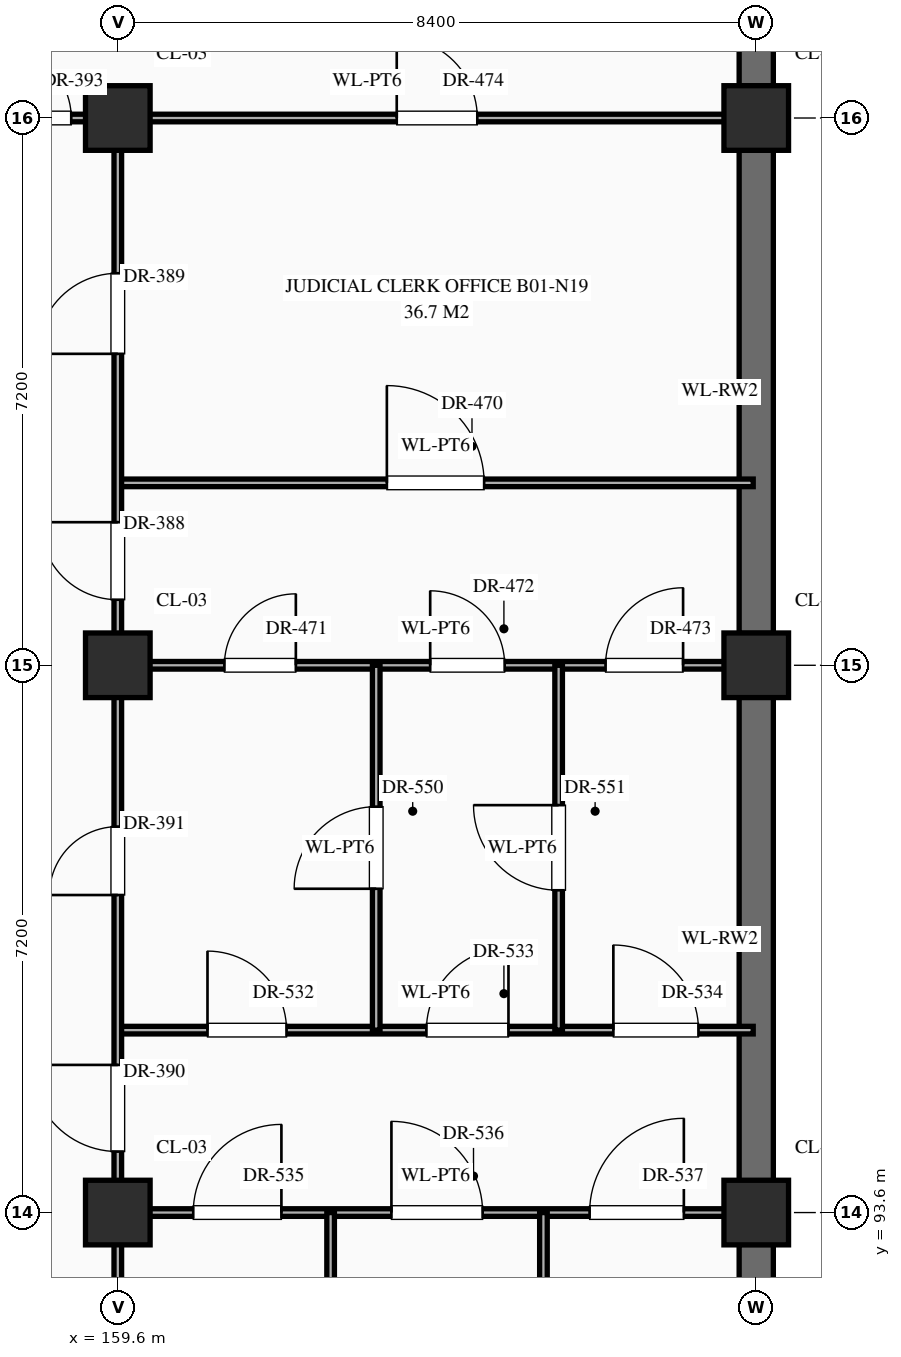
"""IFC4 building model, lengths in metres.
Left out: names, types, materials, properties, quantities, classifications, styles, units other than length and angle.
Written with IfcOpenShell. Run it as: python <this file> out.ifc"""

import sys

from ifc_helpers import new_model, si_unit, direction, frame, frame_2d, origin, origin_2d, place, context, subcontext, project, spatial, rectangle, extrude, element, fill, save


model = new_model("IFC4")
c1 = context("Model", 3, precision=1e-05, world=origin(), true_north=direction((0.0, 1.0)))
c2 = subcontext(c1, "Body", "Model", "MODEL_VIEW")
j1 = project(units=[si_unit("LENGTHUNIT", "METRE"), si_unit("PLANEANGLEUNIT", "RADIAN")], contexts=[c1])
p1 = place(None, origin())
s1 = spatial("IfcSite", under=j1, at=p1, CompositionType="ELEMENT")
p2 = place(p1, origin())
s2 = spatial("IfcBuilding", under=s1, at=p2, CompositionType="ELEMENT")
p3 = place(p2, frame((0.0, 0.0, -5.4)))
s3 = spatial("IfcBuildingStorey", under=s2, at=p3, CompositionType="ELEMENT", Elevation=-5.4)
for number, where, z_axis, x_axis in (
    (1, (159.6, 93.6, 0.0), (0.0, 0.0, 1.0), (1.0, 0.0, 0.0)),
    (2, (159.6, 100.8, 0.0), (0.0, 0.0, 1.0), (1.0, 0.0, 0.0)),
    (3, (159.6, 108.0, 0.0), (0.0, 0.0, 1.0), (1.0, 0.0, 0.0)),
    (4, (168.0, 93.6, 0.0), (0.0, 0.0, 1.0), (1.0, 0.0, 0.0)),
    (5, (168.0, 100.8, 0.0), (0.0, 0.0, 1.0), (1.0, 0.0, 0.0)),
    (6, (168.0, 108.0, 0.0), (0.0, 0.0, 1.0), (1.0, 0.0, 0.0)),
):
    element("IfcColumn", number, at=place(p3, frame(where, z_axis=z_axis, x_axis=x_axis)), inside=s3, PredefinedType="COLUMN", context=c2, shape_type="SweptSolid", body=[
        extrude(rectangle(XDim=0.85, YDim=0.85, at=origin_2d()), origin(), (0.0, 0.0, 1.0), 5.4),
    ])
for number, where, z_axis, x_axis in (
    (7, (168.0, 86.82, 0.0), (0.0, 0.0, 1.0), (0.0, 1.0, 0.0)),
    (8, (168.0, 94.02, 0.0), (0.0, 0.0, 1.0), (0.0, 1.0, 0.0)),
):
    element("IfcWall", number, at=place(p3, frame(where, z_axis=z_axis, x_axis=x_axis)), inside=s3, PredefinedType="USERDEFINED", context=c2, shape_type="SweptSolid", body=[
        extrude(rectangle(XDim=6.36, YDim=0.45, at=frame_2d((3.18, 0.0))), origin(), (0.0, 0.0, 1.0), 5.1),
    ])
p4 = place(p3, frame((168.0, 101.22, 0.0), z_axis=(0.0, 0.0, 1.0), x_axis=(0.0, 1.0, 0.0)))
e9 = element("IfcWall", 9, at=p4, inside=s3, PredefinedType="USERDEFINED", context=c2, shape_type="SweptSolid", body=[
    extrude(rectangle(XDim=6.36, YDim=0.45, at=frame_2d((3.18, 0.0))), origin(), (0.0, 0.0, 1.0), 5.1),
])
p5 = place(p3, frame((168.0, 108.42, 0.0), z_axis=(0.0, 0.0, 1.0), x_axis=(0.0, 1.0, 0.0)))
e10 = element("IfcWall", 10, at=p5, inside=s3, PredefinedType="USERDEFINED", context=c2, shape_type="SweptSolid", body=[
    extrude(rectangle(XDim=6.36, YDim=0.45, at=frame_2d((3.18, 0.0))), origin(), (0.0, 0.0, 1.0), 4.98),
])
p6 = place(p3, frame((159.6, 93.6, 0.0), z_axis=(0.0, 0.0, 1.0), x_axis=(1.0, 0.0, 0.0)))
e11 = element("IfcWall", 11, at=p6, inside=s3, PredefinedType="STANDARD", context=c2, shape_type="SweptSolid", body=[
    extrude(rectangle(XDim=8.36, YDim=0.1, at=frame_2d((4.18, 0.0))), origin(), (0.0, 0.0, 1.0), 4.25),
])
p7 = place(p6, frame((0.992, 0.0, 0.0)))
e12 = element("IfcOpeningElement", 12, at=p7, cuts=e11, PredefinedType="OPENING", context=c2, shape_type="SweptSolid", body=[
    extrude(rectangle(XDim=1.16, YDim=2.3, at=frame_2d((0.58, 1.15))), frame((0.0, 0.062, 0.0), z_axis=(0.0, -1.0, 0.0), x_axis=(1.0, 0.0, 0.0)), (0.0, 0.0, 1.0), 0.124),
])
p8 = place(p6, frame((3.6, 0.0, 0.0)))
e13 = element("IfcOpeningElement", 13, at=p8, cuts=e11, PredefinedType="OPENING", context=c2, shape_type="SweptSolid", body=[
    extrude(rectangle(XDim=1.2, YDim=2.35, at=frame_2d((0.6, 1.175))), frame((0.0, 0.062, 0.0), z_axis=(0.0, -1.0, 0.0), x_axis=(1.0, 0.0, 0.0)), (0.0, 0.0, 1.0), 0.124),
])
p9 = place(p6, frame((6.208, 0.0, 0.0)))
e14 = element("IfcOpeningElement", 14, at=p9, cuts=e11, PredefinedType="OPENING", context=c2, shape_type="SweptSolid", body=[
    extrude(rectangle(XDim=1.24, YDim=2.3, at=frame_2d((0.62, 1.15))), frame((0.0, 0.062, 0.0), z_axis=(0.0, -1.0, 0.0), x_axis=(1.0, 0.0, 0.0)), (0.0, 0.0, 1.0), 0.124),
])
p10 = place(p3, frame((159.6, 96.0, 0.0), z_axis=(0.0, 0.0, 1.0), x_axis=(1.0, 0.0, 0.0)))
e15 = element("IfcWall", 15, at=p10, inside=s3, PredefinedType="STANDARD", context=c2, shape_type="SweptSolid", body=[
    extrude(rectangle(XDim=8.36, YDim=0.1, at=frame_2d((4.18, 0.0))), origin(), (0.0, 0.0, 1.0), 5.1),
])
p11 = place(p10, frame((1.18, 0.0, 0.0)))
e16 = element("IfcOpeningElement", 16, at=p11, cuts=e15, PredefinedType="OPENING", context=c2, shape_type="SweptSolid", body=[
    extrude(rectangle(XDim=1.04, YDim=2.2, at=frame_2d((0.52, 1.1))), frame((0.0, 0.062, 0.0), z_axis=(0.0, -1.0, 0.0), x_axis=(1.0, 0.0, 0.0)), (0.0, 0.0, 1.0), 0.124),
])
p12 = place(p10, frame((4.06, 0.0, 0.0)))
e17 = element("IfcOpeningElement", 17, at=p12, cuts=e15, PredefinedType="OPENING", context=c2, shape_type="SweptSolid", body=[
    extrude(rectangle(XDim=1.08, YDim=2.25, at=frame_2d((0.54, 1.125))), frame((0.0, 0.062, 0.0), z_axis=(0.0, -1.0, 0.0), x_axis=(1.0, 0.0, 0.0)), (0.0, 0.0, 1.0), 0.124),
])
p13 = place(p10, frame((6.52, 0.0, 0.0)))
e18 = element("IfcOpeningElement", 18, at=p13, cuts=e15, PredefinedType="OPENING", context=c2, shape_type="SweptSolid", body=[
    extrude(rectangle(XDim=1.12, YDim=2.25, at=frame_2d((0.56, 1.125))), frame((0.0, 0.062, 0.0), z_axis=(0.0, -1.0, 0.0), x_axis=(1.0, 0.0, 0.0)), (0.0, 0.0, 1.0), 0.124),
])
p14 = place(p3, frame((159.6, 100.8, 0.0), z_axis=(0.0, 0.0, 1.0), x_axis=(1.0, 0.0, 0.0)))
e19 = element("IfcWall", 19, at=p14, inside=s3, PredefinedType="STANDARD", context=c2, shape_type="SweptSolid", body=[
    extrude(rectangle(XDim=8.36, YDim=0.1, at=frame_2d((4.18, 0.0))), origin(), (0.0, 0.0, 1.0), 4.25),
])
p15 = place(p14, frame((1.403, 0.0, 0.0)))
e20 = element("IfcOpeningElement", 20, at=p15, cuts=e19, PredefinedType="OPENING", context=c2, shape_type="SweptSolid", body=[
    extrude(rectangle(XDim=0.94, YDim=2.3, at=frame_2d((0.47, 1.15))), frame((0.0, 0.062, 0.0), z_axis=(0.0, -1.0, 0.0), x_axis=(1.0, 0.0, 0.0)), (0.0, 0.0, 1.0), 0.124),
])
p16 = place(p14, frame((4.11, 0.0, 0.0)))
e21 = element("IfcOpeningElement", 21, at=p16, cuts=e19, PredefinedType="OPENING", context=c2, shape_type="SweptSolid", body=[
    extrude(rectangle(XDim=0.98, YDim=2.35, at=frame_2d((0.49, 1.175))), frame((0.0, 0.062, 0.0), z_axis=(0.0, -1.0, 0.0), x_axis=(1.0, 0.0, 0.0)), (0.0, 0.0, 1.0), 0.124),
])
p17 = place(p14, frame((6.417, 0.0, 0.0)))
e22 = element("IfcOpeningElement", 22, at=p17, cuts=e19, PredefinedType="OPENING", context=c2, shape_type="SweptSolid", body=[
    extrude(rectangle(XDim=1.02, YDim=2.4, at=frame_2d((0.51, 1.2))), frame((0.0, 0.062, 0.0), z_axis=(0.0, -1.0, 0.0), x_axis=(1.0, 0.0, 0.0)), (0.0, 0.0, 1.0), 0.124),
])
p18 = place(p3, frame((159.6, 103.2, 0.0), z_axis=(0.0, 0.0, 1.0), x_axis=(1.0, 0.0, 0.0)))
e23 = element("IfcWall", 23, at=p18, inside=s3, PredefinedType="STANDARD", context=c2, shape_type="SweptSolid", body=[
    extrude(rectangle(XDim=8.36, YDim=0.1, at=frame_2d((4.18, 0.0))), origin(), (0.0, 0.0, 1.0), 5.1),
])
p19 = place(p18, frame((3.54, 0.0, 0.0)))
e24 = element("IfcOpeningElement", 24, at=p19, cuts=e23, PredefinedType="OPENING", context=c2, shape_type="SweptSolid", body=[
    extrude(rectangle(XDim=1.28, YDim=2.35, at=frame_2d((0.64, 1.175))), frame((0.0, 0.062, 0.0), z_axis=(0.0, -1.0, 0.0), x_axis=(1.0, 0.0, 0.0)), (0.0, 0.0, 1.0), 0.124),
])
p20 = place(p3, frame((157.8, 108.0, 0.0), z_axis=(0.0, 0.0, 1.0), x_axis=(1.0, 0.0, 0.0)))
e25 = element("IfcWall", 25, at=p20, inside=s3, PredefinedType="STANDARD", context=c2, shape_type="SweptSolid", body=[
    extrude(rectangle(XDim=10.16, YDim=0.1, at=frame_2d((5.08, 0.0))), origin(), (0.0, 0.0, 1.0), 4.13),
])
p21 = place(p20, frame((0.268, 0.0, 0.0)))
e26 = element("IfcOpeningElement", 26, at=p21, cuts=e25, PredefinedType="OPENING", context=c2, shape_type="SweptSolid", body=[
    extrude(rectangle(XDim=0.92, YDim=2.15, at=frame_2d((0.46, 1.075))), frame((0.0, 0.062, 0.0), z_axis=(0.0, -1.0, 0.0), x_axis=(1.0, 0.0, 0.0)), (0.0, 0.0, 1.0), 0.124),
])
p22 = place(p20, frame((5.47, 0.0, 0.0)))
e27 = element("IfcOpeningElement", 27, at=p22, cuts=e25, PredefinedType="OPENING", context=c2, shape_type="SweptSolid", body=[
    extrude(rectangle(XDim=1.06, YDim=2.4, at=frame_2d((0.53, 1.2))), frame((0.0, 0.062, 0.0), z_axis=(0.0, -1.0, 0.0), x_axis=(1.0, 0.0, 0.0)), (0.0, 0.0, 1.0), 0.124),
])
p23 = place(p3, frame((159.6, 43.2, 0.0), z_axis=(0.0, 0.0, 1.0), x_axis=(0.0, 1.0, 0.0)))
e28 = element("IfcWall", 28, at=p23, inside=s3, PredefinedType="STANDARD", context=c2, shape_type="SweptSolid", body=[
    extrude(rectangle(XDim=64.8, YDim=0.1, at=frame_2d((32.4, 0.0))), origin(), (0.0, 0.0, 1.0), 4.35),
])
p24 = place(p23, frame((58.462, 0.0, 0.0)))
e29 = element("IfcOpeningElement", 29, at=p24, cuts=e28, PredefinedType="OPENING", context=c2, shape_type="SweptSolid", body=[
    extrude(rectangle(XDim=1.02, YDim=2.4, at=frame_2d((0.51, 1.2))), frame((0.0, 0.062, 0.0), z_axis=(0.0, -1.0, 0.0), x_axis=(1.0, 0.0, 0.0)), (0.0, 0.0, 1.0), 0.124),
])
p25 = place(p23, frame((61.698, 0.0, 0.0)))
e30 = element("IfcOpeningElement", 30, at=p25, cuts=e28, PredefinedType="OPENING", context=c2, shape_type="SweptSolid", body=[
    extrude(rectangle(XDim=1.06, YDim=2.4, at=frame_2d((0.53, 1.2))), frame((0.0, 0.062, 0.0), z_axis=(0.0, -1.0, 0.0), x_axis=(1.0, 0.0, 0.0)), (0.0, 0.0, 1.0), 0.124),
])
p26 = place(p23, frame((51.202, 0.0, 0.0)))
e31 = element("IfcOpeningElement", 31, at=p26, cuts=e28, PredefinedType="OPENING", context=c2, shape_type="SweptSolid", body=[
    extrude(rectangle(XDim=1.14, YDim=2.4, at=frame_2d((0.57, 1.2))), frame((0.0, 0.062, 0.0), z_axis=(0.0, -1.0, 0.0), x_axis=(1.0, 0.0, 0.0)), (0.0, 0.0, 1.0), 0.124),
])
p27 = place(p23, frame((54.577, 0.0, 0.0)))
e32 = element("IfcOpeningElement", 32, at=p27, cuts=e28, PredefinedType="OPENING", context=c2, shape_type="SweptSolid", body=[
    extrude(rectangle(XDim=0.9, YDim=2.15, at=frame_2d((0.45, 1.075))), frame((0.0, 0.062, 0.0), z_axis=(0.0, -1.0, 0.0), x_axis=(1.0, 0.0, 0.0)), (0.0, 0.0, 1.0), 0.124),
])
p28 = place(p23, frame((46.37, 0.0, 0.0)))
e33 = element("IfcOpeningElement", 33, at=p28, cuts=e28, PredefinedType="OPENING", context=c2, shape_type="SweptSolid", body=[
    extrude(rectangle(XDim=0.86, YDim=2.1, at=frame_2d((0.43, 1.05))), frame((0.0, 0.062, 0.0), z_axis=(0.0, -1.0, 0.0), x_axis=(1.0, 0.0, 0.0)), (0.0, 0.0, 1.0), 0.124),
])
p29 = place(p23, frame((41.347, 0.0, 0.0)))
e34 = element("IfcOpeningElement", 34, at=p29, cuts=e28, PredefinedType="OPENING", context=c2, shape_type="SweptSolid", body=[
    extrude(rectangle(XDim=0.96, YDim=2.2, at=frame_2d((0.48, 1.1))), frame((0.0, 0.062, 0.0), z_axis=(0.0, -1.0, 0.0), x_axis=(1.0, 0.0, 0.0)), (0.0, 0.0, 1.0), 0.124),
])
p30 = place(p23, frame((38.073, 0.0, 0.0)))
e35 = element("IfcOpeningElement", 35, at=p30, cuts=e28, PredefinedType="OPENING", context=c2, shape_type="SweptSolid", body=[
    extrude(rectangle(XDim=1.0, YDim=2.25, at=frame_2d((0.5, 1.125))), frame((0.0, 0.062, 0.0), z_axis=(0.0, -1.0, 0.0), x_axis=(1.0, 0.0, 0.0)), (0.0, 0.0, 1.0), 0.124),
])
p31 = place(p23, frame((24.66, 0.0, 0.0)))
e36 = element("IfcOpeningElement", 36, at=p31, cuts=e28, PredefinedType="OPENING", context=c2, shape_type="SweptSolid", body=[
    extrude(rectangle(XDim=1.08, YDim=2.25, at=frame_2d((0.54, 1.125))), frame((0.0, 0.062, 0.0), z_axis=(0.0, -1.0, 0.0), x_axis=(1.0, 0.0, 0.0)), (0.0, 0.0, 1.0), 0.124),
])
p32 = place(p23, frame((10.16, 0.0, 0.0)))
e37 = element("IfcOpeningElement", 37, at=p32, cuts=e28, PredefinedType="OPENING", context=c2, shape_type="SweptSolid", body=[
    extrude(rectangle(XDim=1.28, YDim=2.35, at=frame_2d((0.64, 1.175))), frame((0.0, 0.062, 0.0), z_axis=(0.0, -1.0, 0.0), x_axis=(1.0, 0.0, 0.0)), (0.0, 0.0, 1.0), 0.124),
])
p33 = place(p3, frame((162.4, 86.4, 0.0), z_axis=(0.0, 0.0, 1.0), x_axis=(0.0, 1.0, 0.0)))
e38 = element("IfcWall", 38, at=p33, inside=s3, PredefinedType="STANDARD", context=c2, shape_type="SweptSolid", body=[
    extrude(rectangle(XDim=7.2, YDim=0.1, at=frame_2d((3.6, 0.0))), origin(), (0.0, 0.0, 1.0), 5.1),
])
p34 = place(p33, frame((3.06, 0.0, 0.0)))
e39 = element("IfcOpeningElement", 39, at=p34, cuts=e38, PredefinedType="OPENING", context=c2, shape_type="SweptSolid", body=[
    extrude(rectangle(XDim=1.08, YDim=2.25, at=frame_2d((0.54, 1.125))), frame((0.0, 0.062, 0.0), z_axis=(0.0, -1.0, 0.0), x_axis=(1.0, 0.0, 0.0)), (0.0, 0.0, 1.0), 0.124),
])
p35 = place(p3, frame((163.0, 96.0, 0.0), z_axis=(0.0, 0.0, 1.0), x_axis=(0.0, 1.0, 0.0)))
e40 = element("IfcWall", 40, at=p35, inside=s3, PredefinedType="STANDARD", context=c2, shape_type="SweptSolid", body=[
    extrude(rectangle(XDim=4.8, YDim=0.1, at=frame_2d((2.4, 0.0))), origin(), (0.0, 0.0, 1.0), 5.1),
])
p36 = place(p35, frame((1.86, 0.0, 0.0)))
e41 = element("IfcOpeningElement", 41, at=p36, cuts=e40, PredefinedType="OPENING", context=c2, shape_type="SweptSolid", body=[
    extrude(rectangle(XDim=1.08, YDim=2.25, at=frame_2d((0.54, 1.125))), frame((0.0, 0.062, 0.0), z_axis=(0.0, -1.0, 0.0), x_axis=(1.0, 0.0, 0.0)), (0.0, 0.0, 1.0), 0.124),
])
p37 = place(p3, frame((165.2, 86.4, 0.0), z_axis=(0.0, 0.0, 1.0), x_axis=(0.0, 1.0, 0.0)))
e42 = element("IfcWall", 42, at=p37, inside=s3, PredefinedType="STANDARD", context=c2, shape_type="SweptSolid", body=[
    extrude(rectangle(XDim=7.2, YDim=0.1, at=frame_2d((3.6, 0.0))), origin(), (0.0, 0.0, 1.0), 5.1),
])
p38 = place(p37, frame((3.02, 0.0, 0.0)))
e43 = element("IfcOpeningElement", 43, at=p38, cuts=e42, PredefinedType="OPENING", context=c2, shape_type="SweptSolid", body=[
    extrude(rectangle(XDim=1.16, YDim=2.3, at=frame_2d((0.58, 1.15))), frame((0.0, 0.062, 0.0), z_axis=(0.0, -1.0, 0.0), x_axis=(1.0, 0.0, 0.0)), (0.0, 0.0, 1.0), 0.124),
])
p39 = place(p3, frame((165.4, 96.0, 0.0), z_axis=(0.0, 0.0, 1.0), x_axis=(0.0, 1.0, 0.0)))
e44 = element("IfcWall", 44, at=p39, inside=s3, PredefinedType="STANDARD", context=c2, shape_type="SweptSolid", body=[
    extrude(rectangle(XDim=4.8, YDim=0.1, at=frame_2d((2.4, 0.0))), origin(), (0.0, 0.0, 1.0), 5.1),
])
p40 = place(p39, frame((1.84, 0.0, 0.0)))
e45 = element("IfcOpeningElement", 45, at=p40, cuts=e44, PredefinedType="OPENING", context=c2, shape_type="SweptSolid", body=[
    extrude(rectangle(XDim=1.12, YDim=2.25, at=frame_2d((0.56, 1.125))), frame((0.0, 0.062, 0.0), z_axis=(0.0, -1.0, 0.0), x_axis=(1.0, 0.0, 0.0)), (0.0, 0.0, 1.0), 0.124),
])
p41 = place(p24, origin())
e46 = element("IfcDoor", 46, at=p41, inside=s3, OperationType="SINGLE_SWING_RIGHT", PredefinedType="DOOR", context=c2, shape_type="SweptSolid", body=[
    extrude(rectangle(XDim=1.02, YDim=2.4, at=frame_2d((0.51, 1.2))), frame((0.0, 0.025, 0.0), z_axis=(0.0, -1.0, 0.0), x_axis=(1.0, 0.0, 0.0)), (0.0, 0.0, 1.0), 0.05),
])
fill(e29, e46)
p42 = place(p25, origin())
e47 = element("IfcDoor", 47, at=p42, inside=s3, OperationType="SINGLE_SWING_LEFT", PredefinedType="DOOR", context=c2, shape_type="SweptSolid", body=[
    extrude(rectangle(XDim=1.06, YDim=2.4, at=frame_2d((0.53, 1.2))), frame((0.0, 0.025, 0.0), z_axis=(0.0, -1.0, 0.0), x_axis=(1.0, 0.0, 0.0)), (0.0, 0.0, 1.0), 0.05),
])
fill(e30, e47)
p43 = place(p26, origin())
e48 = element("IfcDoor", 48, at=p43, inside=s3, OperationType="SINGLE_SWING_RIGHT", PredefinedType="DOOR", context=c2, shape_type="SweptSolid", body=[
    extrude(rectangle(XDim=1.14, YDim=2.4, at=frame_2d((0.57, 1.2))), frame((0.0, 0.025, 0.0), z_axis=(0.0, -1.0, 0.0), x_axis=(1.0, 0.0, 0.0)), (0.0, 0.0, 1.0), 0.05),
])
fill(e31, e48)
p44 = place(p27, origin())
e49 = element("IfcDoor", 49, at=p44, inside=s3, OperationType="SINGLE_SWING_LEFT", PredefinedType="DOOR", context=c2, shape_type="SweptSolid", body=[
    extrude(rectangle(XDim=0.9, YDim=2.15, at=frame_2d((0.45, 1.075))), frame((0.0, 0.025, 0.0), z_axis=(0.0, -1.0, 0.0), x_axis=(1.0, 0.0, 0.0)), (0.0, 0.0, 1.0), 0.05),
])
fill(e32, e49)
p45 = place(p21, origin())
e50 = element("IfcDoor", 50, at=p45, inside=s3, OperationType="SINGLE_SWING_LEFT", PredefinedType="DOOR", context=c2, shape_type="SweptSolid", body=[
    extrude(rectangle(XDim=0.92, YDim=2.15, at=frame_2d((0.46, 1.075))), frame((0.0, 0.025, 0.0), z_axis=(0.0, -1.0, 0.0), x_axis=(1.0, 0.0, 0.0)), (0.0, 0.0, 1.0), 0.05),
])
fill(e26, e50)
p46 = place(p19, origin())
e51 = element("IfcDoor", 51, at=p46, inside=s3, OperationType="SINGLE_SWING_LEFT", PredefinedType="DOOR", context=c2, shape_type="SweptSolid", body=[
    extrude(rectangle(XDim=1.28, YDim=2.35, at=frame_2d((0.64, 1.175))), frame((0.0, 0.025, 0.0), z_axis=(0.0, -1.0, 0.0), x_axis=(1.0, 0.0, 0.0)), (0.0, 0.0, 1.0), 0.05),
])
fill(e24, e51)
p47 = place(p15, origin())
e52 = element("IfcDoor", 52, at=p47, inside=s3, OperationType="SINGLE_SWING_RIGHT", PredefinedType="DOOR", context=c2, shape_type="SweptSolid", body=[
    extrude(rectangle(XDim=0.94, YDim=2.3, at=frame_2d((0.47, 1.15))), frame((0.0, 0.025, 0.0), z_axis=(0.0, -1.0, 0.0), x_axis=(1.0, 0.0, 0.0)), (0.0, 0.0, 1.0), 0.05),
])
fill(e20, e52)
p48 = place(p16, origin())
e53 = element("IfcDoor", 53, at=p48, inside=s3, OperationType="SINGLE_SWING_LEFT", PredefinedType="DOOR", context=c2, shape_type="SweptSolid", body=[
    extrude(rectangle(XDim=0.98, YDim=2.35, at=frame_2d((0.49, 1.175))), frame((0.0, 0.025, 0.0), z_axis=(0.0, -1.0, 0.0), x_axis=(1.0, 0.0, 0.0)), (0.0, 0.0, 1.0), 0.05),
])
fill(e21, e53)
p49 = place(p17, origin())
e54 = element("IfcDoor", 54, at=p49, inside=s3, OperationType="SINGLE_SWING_RIGHT", PredefinedType="DOOR", context=c2, shape_type="SweptSolid", body=[
    extrude(rectangle(XDim=1.02, YDim=2.4, at=frame_2d((0.51, 1.2))), frame((0.0, 0.025, 0.0), z_axis=(0.0, -1.0, 0.0), x_axis=(1.0, 0.0, 0.0)), (0.0, 0.0, 1.0), 0.05),
])
fill(e22, e54)
p50 = place(p22, origin())
e55 = element("IfcDoor", 55, at=p50, inside=s3, OperationType="SINGLE_SWING_LEFT", PredefinedType="DOOR", context=c2, shape_type="SweptSolid", body=[
    extrude(rectangle(XDim=1.06, YDim=2.4, at=frame_2d((0.53, 1.2))), frame((0.0, 0.025, 0.0), z_axis=(0.0, -1.0, 0.0), x_axis=(1.0, 0.0, 0.0)), (0.0, 0.0, 1.0), 0.05),
])
fill(e27, e55)
p51 = place(p11, origin())
e56 = element("IfcDoor", 56, at=p51, inside=s3, OperationType="SINGLE_SWING_LEFT", PredefinedType="DOOR", context=c2, shape_type="SweptSolid", body=[
    extrude(rectangle(XDim=1.04, YDim=2.2, at=frame_2d((0.52, 1.1))), frame((0.0, 0.025, 0.0), z_axis=(0.0, -1.0, 0.0), x_axis=(1.0, 0.0, 0.0)), (0.0, 0.0, 1.0), 0.05),
])
fill(e16, e56)
p52 = place(p12, origin())
e57 = element("IfcDoor", 57, at=p52, inside=s3, OperationType="SINGLE_SWING_RIGHT", PredefinedType="DOOR", context=c2, shape_type="SweptSolid", body=[
    extrude(rectangle(XDim=1.08, YDim=2.25, at=frame_2d((0.54, 1.125))), frame((0.0, 0.025, 0.0), z_axis=(0.0, -1.0, 0.0), x_axis=(1.0, 0.0, 0.0)), (0.0, 0.0, 1.0), 0.05),
])
fill(e17, e57)
p53 = place(p13, origin())
e58 = element("IfcDoor", 58, at=p53, inside=s3, OperationType="SINGLE_SWING_LEFT", PredefinedType="DOOR", context=c2, shape_type="SweptSolid", body=[
    extrude(rectangle(XDim=1.12, YDim=2.25, at=frame_2d((0.56, 1.125))), frame((0.0, 0.025, 0.0), z_axis=(0.0, -1.0, 0.0), x_axis=(1.0, 0.0, 0.0)), (0.0, 0.0, 1.0), 0.05),
])
fill(e18, e58)
p54 = place(p7, origin())
e59 = element("IfcDoor", 59, at=p54, inside=s3, OperationType="SINGLE_SWING_RIGHT", PredefinedType="DOOR", context=c2, shape_type="SweptSolid", body=[
    extrude(rectangle(XDim=1.16, YDim=2.3, at=frame_2d((0.58, 1.15))), frame((0.0, 0.025, 0.0), z_axis=(0.0, -1.0, 0.0), x_axis=(1.0, 0.0, 0.0)), (0.0, 0.0, 1.0), 0.05),
])
fill(e12, e59)
p55 = place(p8, origin())
e60 = element("IfcDoor", 60, at=p55, inside=s3, OperationType="SINGLE_SWING_LEFT", PredefinedType="DOOR", context=c2, shape_type="SweptSolid", body=[
    extrude(rectangle(XDim=1.2, YDim=2.35, at=frame_2d((0.6, 1.175))), frame((0.0, 0.025, 0.0), z_axis=(0.0, -1.0, 0.0), x_axis=(1.0, 0.0, 0.0)), (0.0, 0.0, 1.0), 0.05),
])
fill(e13, e60)
p56 = place(p9, origin())
e61 = element("IfcDoor", 61, at=p56, inside=s3, OperationType="SINGLE_SWING_RIGHT", PredefinedType="DOOR", context=c2, shape_type="SweptSolid", body=[
    extrude(rectangle(XDim=1.24, YDim=2.3, at=frame_2d((0.62, 1.15))), frame((0.0, 0.025, 0.0), z_axis=(0.0, -1.0, 0.0), x_axis=(1.0, 0.0, 0.0)), (0.0, 0.0, 1.0), 0.05),
])
fill(e14, e61)
p57 = place(p36, origin())
e62 = element("IfcDoor", 62, at=p57, inside=s3, OperationType="SINGLE_SWING_LEFT", PredefinedType="DOOR", context=c2, shape_type="SweptSolid", body=[
    extrude(rectangle(XDim=1.08, YDim=2.25, at=frame_2d((0.54, 1.125))), frame((0.0, 0.025, 0.0), z_axis=(0.0, -1.0, 0.0), x_axis=(1.0, 0.0, 0.0)), (0.0, 0.0, 1.0), 0.05),
])
fill(e41, e62)
p58 = place(p40, origin())
e63 = element("IfcDoor", 63, at=p58, inside=s3, OperationType="SINGLE_SWING_RIGHT", PredefinedType="DOOR", context=c2, shape_type="SweptSolid", body=[
    extrude(rectangle(XDim=1.12, YDim=2.25, at=frame_2d((0.56, 1.125))), frame((0.0, 0.025, 0.0), z_axis=(0.0, -1.0, 0.0), x_axis=(1.0, 0.0, 0.0)), (0.0, 0.0, 1.0), 0.05),
])
fill(e45, e63)
save(model, sys.argv[1])
